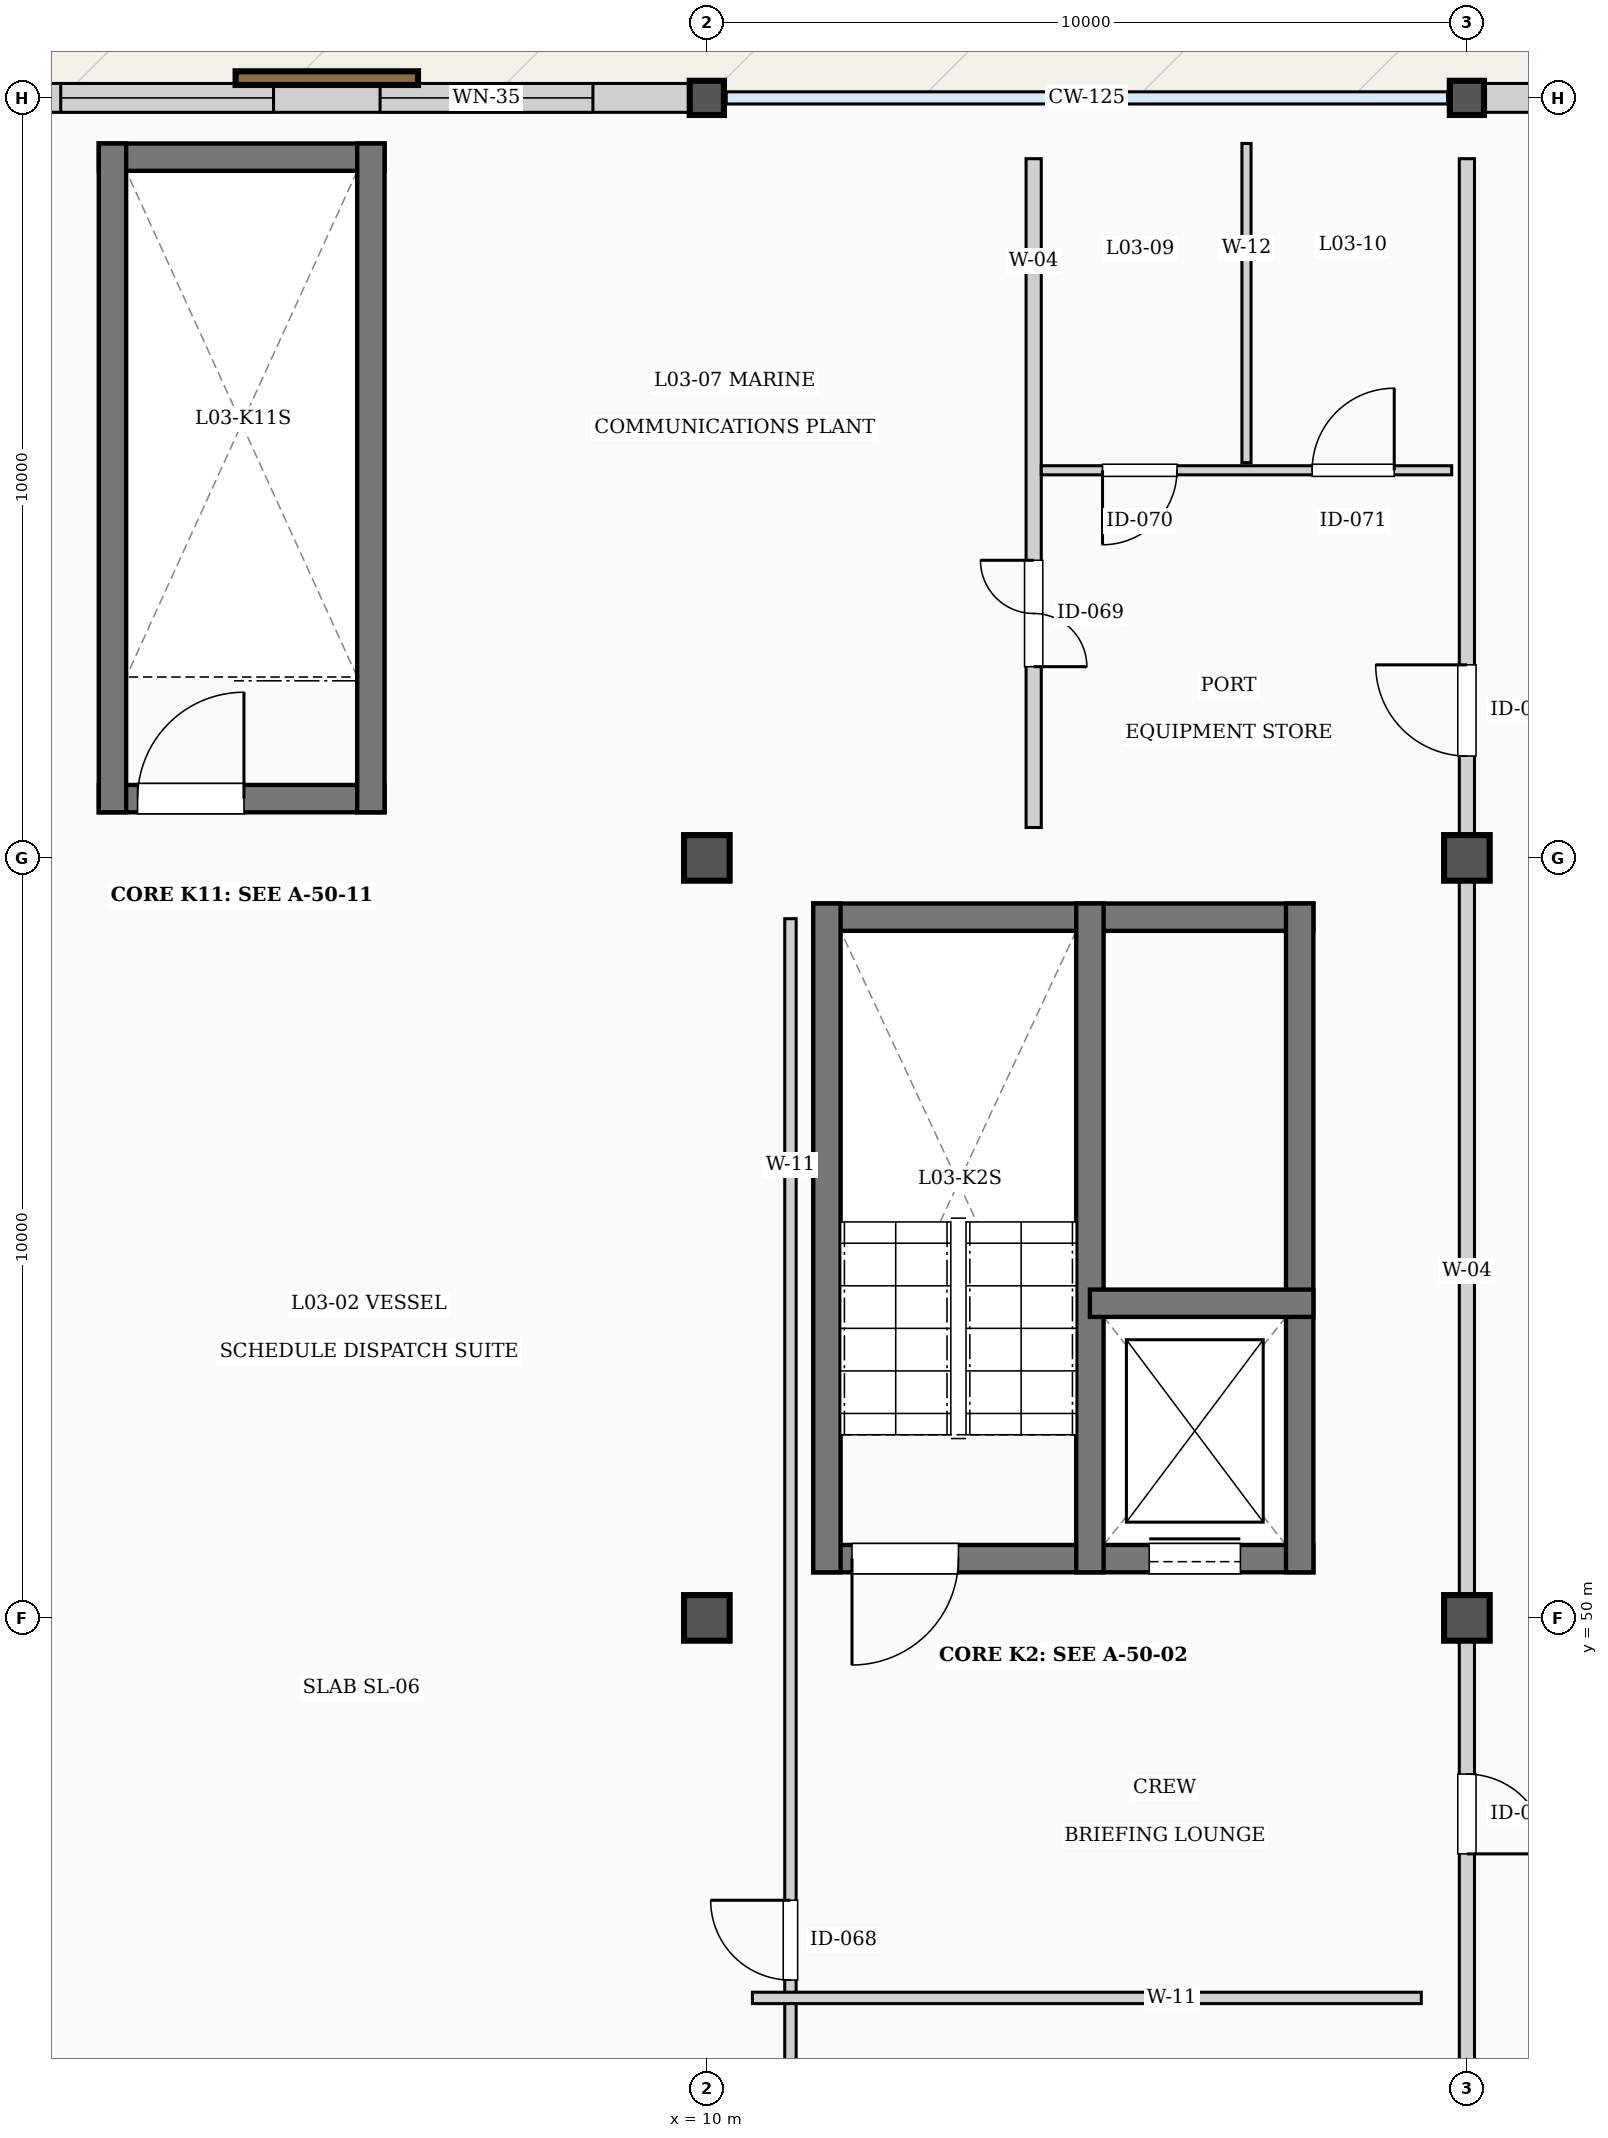
"""IFC4 building model, lengths in metres.
Left out: names, types, materials, properties, quantities, classifications, styles, units other than length and angle.
Written with IfcOpenShell. Run it as: python <this file> out.ifc"""

import sys

from ifc_helpers import new_model, si_unit, direction, frame, frame_2d, origin, origin_2d, place, context, subcontext, project, spatial, rectangle, extrude, element, fill, save


model = new_model("IFC4")
c1 = context("Model", 3, precision=1e-05, world=origin(), true_north=direction((0.0, 1.0)))
c2 = subcontext(c1, "Body", "Model", "MODEL_VIEW")
j1 = project(units=[si_unit("LENGTHUNIT", "METRE"), si_unit("PLANEANGLEUNIT", "RADIAN")], contexts=[c1])
p1 = place(None, origin())
s1 = spatial("IfcSite", under=j1, at=p1, CompositionType="ELEMENT")
p2 = place(p1, origin())
s2 = spatial("IfcBuilding", under=s1, at=p2, CompositionType="ELEMENT")
p3 = place(p2, frame((0.0, 0.0, 14.4)))
s3 = spatial("IfcBuildingStorey", under=s2, at=p3, CompositionType="ELEMENT", Elevation=14.4)
for number, where, z_axis, x_axis in (
    (1, (10.0, 50.0, 0.0), (0.0, 0.0, 1.0), (1.0, 0.0, 0.0)),
    (2, (10.0, 60.0, 0.0), (0.0, 0.0, 1.0), (1.0, 0.0, 0.0)),
):
    element("IfcColumn", number, at=place(p3, frame(where, z_axis=z_axis, x_axis=x_axis)), inside=s3, PredefinedType="COLUMN", context=c2, shape_type="SweptSolid", body=[
        extrude(rectangle(XDim=0.6, YDim=0.6, at=origin_2d()), origin(), (0.0, 0.0, 1.0), 3.9),
    ])
p4 = place(p3, frame((10.0, 70.0, 0.0), z_axis=(0.0, 0.0, 1.0), x_axis=(1.0, 0.0, 0.0)))
e3 = element("IfcColumn", 3, at=p4, inside=s3, PredefinedType="COLUMN", context=c2, shape_type="SweptSolid", body=[
    extrude(rectangle(XDim=0.45, YDim=0.45, at=origin_2d()), origin(), (0.0, 0.0, 1.0), 3.9),
])
for number, where, z_axis, x_axis in (
    (4, (20.0, 50.0, 0.0), (0.0, 0.0, 1.0), (1.0, 0.0, 0.0)),
    (5, (20.0, 60.0, 0.0), (0.0, 0.0, 1.0), (1.0, 0.0, 0.0)),
):
    element("IfcColumn", number, at=place(p3, frame(where, z_axis=z_axis, x_axis=x_axis)), inside=s3, PredefinedType="COLUMN", context=c2, shape_type="SweptSolid", body=[
        extrude(rectangle(XDim=0.6, YDim=0.6, at=origin_2d()), origin(), (0.0, 0.0, 1.0), 3.9),
    ])
p5 = place(p3, frame((20.0, 70.0, 0.0), z_axis=(0.0, 0.0, 1.0), x_axis=(1.0, 0.0, 0.0)))
e6 = element("IfcColumn", 6, at=p5, inside=s3, PredefinedType="COLUMN", context=c2, shape_type="SweptSolid", body=[
    extrude(rectangle(XDim=0.45, YDim=0.45, at=origin_2d()), origin(), (0.0, 0.0, 1.0), 3.9),
])
p6 = place(p3, frame((0.225, 70.0, 0.0), z_axis=(0.0, 0.0, 1.0), x_axis=(1.0, 0.0, 0.0)))
e7 = element("IfcWall", 7, at=p6, inside=s3, PredefinedType="SOLIDWALL", context=c2, shape_type="SweptSolid", body=[
    extrude(rectangle(XDim=9.55, YDim=0.38, at=frame_2d((4.775, 0.0))), origin(), (0.0, 0.0, 1.0), 3.2),
])
p7 = place(p6, frame((1.274, 0.0, 0.9)))
e8 = element("IfcOpeningElement", 8, at=p7, cuts=e7, PredefinedType="OPENING", context=c2, shape_type="SweptSolid", body=[
    extrude(rectangle(XDim=2.8, YDim=1.8, at=frame_2d((1.4, 0.9))), frame((0.0, 0.2, 0.0), z_axis=(0.0, -1.0, 0.0), x_axis=(1.0, 0.0, 0.0)), (0.0, 0.0, 1.0), 0.4),
])
p8 = place(p6, frame((5.476, 0.0, 0.9)))
e9 = element("IfcOpeningElement", 9, at=p8, cuts=e7, PredefinedType="OPENING", context=c2, shape_type="SweptSolid", body=[
    extrude(rectangle(XDim=2.8, YDim=1.8, at=frame_2d((1.4, 0.9))), frame((0.0, 0.2, 0.0), z_axis=(0.0, -1.0, 0.0), x_axis=(1.0, 0.0, 0.0)), (0.0, 0.0, 1.0), 0.4),
])
p9 = place(p3, frame((20.225, 70.0, 0.0), z_axis=(0.0, 0.0, 1.0), x_axis=(1.0, 0.0, 0.0)))
e10 = element("IfcWall", 10, at=p9, inside=s3, PredefinedType="SOLIDWALL", context=c2, shape_type="SweptSolid", body=[
    extrude(rectangle(XDim=9.55, YDim=0.38, at=frame_2d((4.775, 0.0))), origin(), (0.0, 0.0, 1.0), 3.2),
])
p10 = place(p9, frame((4.225, 0.0, 0.0)))
e11 = element("IfcOpeningElement", 11, at=p10, cuts=e10, PredefinedType="OPENING", context=c2, shape_type="SweptSolid", body=[
    extrude(rectangle(XDim=1.1, YDim=2.35, at=frame_2d((0.55, 1.175))), frame((0.0, 0.2, 0.0), z_axis=(0.0, -1.0, 0.0), x_axis=(1.0, 0.0, 0.0)), (0.0, 0.0, 1.0), 0.4),
])
p11 = place(p3, frame((11.4, 50.78, 0.0), z_axis=(0.0, 0.0, 1.0), x_axis=(1.0, 0.0, 0.0)))
e12 = element("IfcWall", 12, at=p11, inside=s3, PredefinedType="SHEAR", context=c2, shape_type="SweptSolid", body=[
    extrude(rectangle(XDim=6.58, YDim=0.36, at=frame_2d((3.29, 0.0))), origin(), (0.0, 0.0, 1.0), 3.9),
])
p12 = place(p11, frame((0.51, 0.0, 0.0)))
e13 = element("IfcOpeningElement", 13, at=p12, cuts=e12, PredefinedType="OPENING", context=c2, shape_type="SweptSolid", body=[
    extrude(rectangle(XDim=1.4, YDim=2.35, at=frame_2d((0.7, 1.175))), frame((0.0, 0.19, 0.0), z_axis=(0.0, -1.0, 0.0), x_axis=(1.0, 0.0, 0.0)), (0.0, 0.0, 1.0), 0.38),
])
p13 = place(p11, frame((4.42, 0.0, 0.0)))
e14 = element("IfcOpeningElement", 14, at=p13, cuts=e12, PredefinedType="OPENING", context=c2, shape_type="SweptSolid", body=[
    extrude(rectangle(XDim=1.2, YDim=2.35, at=frame_2d((0.6, 1.175))), frame((0.0, 0.19, 0.0), z_axis=(0.0, -1.0, 0.0), x_axis=(1.0, 0.0, 0.0)), (0.0, 0.0, 1.0), 0.38),
])
p14 = place(p3, frame((11.4, 59.22, 0.0), z_axis=(0.0, 0.0, 1.0), x_axis=(1.0, 0.0, 0.0)))
e15 = element("IfcWall", 15, at=p14, inside=s3, PredefinedType="SHEAR", context=c2, shape_type="SweptSolid", body=[
    extrude(rectangle(XDim=6.58, YDim=0.36, at=frame_2d((3.29, 0.0))), origin(), (0.0, 0.0, 1.0), 3.9),
])
for number, where, z_axis, x_axis in (
    (16, (11.58, 50.6, 0.0), (0.0, 0.0, 1.0), (0.0, 1.0, 0.0)),
    (17, (17.8, 50.6, 0.0), (0.0, 0.0, 1.0), (0.0, 1.0, 0.0)),
    (18, (15.04, 50.6, 0.0), (0.0, 0.0, 1.0), (0.0, 1.0, 0.0)),
):
    element("IfcWall", number, at=place(p3, frame(where, z_axis=z_axis, x_axis=x_axis)), inside=s3, PredefinedType="SHEAR", context=c2, shape_type="SweptSolid", body=[
        extrude(rectangle(XDim=8.8, YDim=0.36, at=frame_2d((4.4, 0.0))), origin(), (0.0, 0.0, 1.0), 3.9),
    ])
p15 = place(p3, frame((15.04, 54.14, 0.0), z_axis=(0.0, 0.0, 1.0), x_axis=(1.0, 0.0, 0.0)))
e19 = element("IfcWall", 19, at=p15, inside=s3, PredefinedType="SHEAR", context=c2, shape_type="SweptSolid", body=[
    extrude(rectangle(XDim=2.94, YDim=0.36, at=frame_2d((1.47, 0.0))), origin(), (0.0, 0.0, 1.0), 3.9),
])
p16 = place(p3, frame((2.0, 60.78, 0.0), z_axis=(0.0, 0.0, 1.0), x_axis=(1.0, 0.0, 0.0)))
e20 = element("IfcWall", 20, at=p16, inside=s3, PredefinedType="SHEAR", context=c2, shape_type="SweptSolid", body=[
    extrude(rectangle(XDim=3.76, YDim=0.36, at=frame_2d((1.88, 0.0))), origin(), (0.0, 0.0, 1.0), 3.9),
])
p17 = place(p16, frame((0.51, 0.0, 0.0)))
e21 = element("IfcOpeningElement", 21, at=p17, cuts=e20, PredefinedType="OPENING", context=c2, shape_type="SweptSolid", body=[
    extrude(rectangle(XDim=1.4, YDim=2.35, at=frame_2d((0.7, 1.175))), frame((0.0, 0.19, 0.0), z_axis=(0.0, -1.0, 0.0), x_axis=(1.0, 0.0, 0.0)), (0.0, 0.0, 1.0), 0.38),
])
p18 = place(p3, frame((2.0, 69.22, 0.0), z_axis=(0.0, 0.0, 1.0), x_axis=(1.0, 0.0, 0.0)))
e22 = element("IfcWall", 22, at=p18, inside=s3, PredefinedType="SHEAR", context=c2, shape_type="SweptSolid", body=[
    extrude(rectangle(XDim=3.76, YDim=0.36, at=frame_2d((1.88, 0.0))), origin(), (0.0, 0.0, 1.0), 3.9),
])
for number, where, z_axis, x_axis in (
    (23, (2.18, 60.6, 0.0), (0.0, 0.0, 1.0), (0.0, 1.0, 0.0)),
    (24, (5.58, 60.6, 0.0), (0.0, 0.0, 1.0), (0.0, 1.0, 0.0)),
):
    element("IfcWall", number, at=place(p3, frame(where, z_axis=z_axis, x_axis=x_axis)), inside=s3, PredefinedType="SHEAR", context=c2, shape_type="SweptSolid", body=[
        extrude(rectangle(XDim=8.8, YDim=0.36, at=frame_2d((4.4, 0.0))), origin(), (0.0, 0.0, 1.0), 3.9),
    ])
p19 = place(p3, frame((20.0, 20.8, 0.0), z_axis=(0.0, 0.0, 1.0), x_axis=(0.0, 1.0, 0.0)))
e25 = element("IfcWall", 25, at=p19, inside=s3, PredefinedType="PARTITIONING", context=c2, shape_type="SweptSolid", body=[
    extrude(rectangle(XDim=48.4, YDim=0.2, at=frame_2d((24.2, 0.0))), origin(), (0.0, 0.0, 1.0), 3.33),
])
p20 = place(p19, frame((10.332, 0.0, 0.0)))
e26 = element("IfcOpeningElement", 26, at=p20, cuts=e25, PredefinedType="OPENING", context=c2, shape_type="SweptSolid", body=[
    extrude(rectangle(XDim=1.6, YDim=2.4, at=frame_2d((0.8, 1.2))), frame((0.0, 0.11, 0.0), z_axis=(0.0, -1.0, 0.0), x_axis=(1.0, 0.0, 0.0)), (0.0, 0.0, 1.0), 0.22),
])
p21 = place(p19, frame((19.853, 0.0, 0.0)))
e27 = element("IfcOpeningElement", 27, at=p21, cuts=e25, PredefinedType="OPENING", context=c2, shape_type="SweptSolid", body=[
    extrude(rectangle(XDim=0.95, YDim=2.4, at=frame_2d((0.475, 1.2))), frame((0.0, 0.11, 0.0), z_axis=(0.0, -1.0, 0.0), x_axis=(1.0, 0.0, 0.0)), (0.0, 0.0, 1.0), 0.22),
])
p22 = place(p19, frame((26.095, 0.0, 0.0)))
e28 = element("IfcOpeningElement", 28, at=p22, cuts=e25, PredefinedType="OPENING", context=c2, shape_type="SweptSolid", body=[
    extrude(rectangle(XDim=1.05, YDim=2.3, at=frame_2d((0.525, 1.15))), frame((0.0, 0.11, 0.0), z_axis=(0.0, -1.0, 0.0), x_axis=(1.0, 0.0, 0.0)), (0.0, 0.0, 1.0), 0.22),
])
p23 = place(p19, frame((40.54, 0.0, 0.0)))
e29 = element("IfcOpeningElement", 29, at=p23, cuts=e25, PredefinedType="OPENING", context=c2, shape_type="SweptSolid", body=[
    extrude(rectangle(XDim=1.2, YDim=2.35, at=frame_2d((0.6, 1.175))), frame((0.0, 0.11, 0.0), z_axis=(0.0, -1.0, 0.0), x_axis=(1.0, 0.0, 0.0)), (0.0, 0.0, 1.0), 0.22),
])
p24 = place(p3, frame((11.1, 20.8, 0.0), z_axis=(0.0, 0.0, 1.0), x_axis=(0.0, 1.0, 0.0)))
e30 = element("IfcWall", 30, at=p24, inside=s3, PredefinedType="PARTITIONING", context=c2, shape_type="SweptSolid", body=[
    extrude(rectangle(XDim=38.4, YDim=0.15, at=frame_2d((19.2, 0.0))), origin(), (0.0, 0.0, 1.0), 3.56),
])
p25 = place(p24, frame((16.396, 0.0, 0.0)))
e31 = element("IfcOpeningElement", 31, at=p25, cuts=e30, PredefinedType="OPENING", context=c2, shape_type="SweptSolid", body=[
    extrude(rectangle(XDim=1.0, YDim=2.3, at=frame_2d((0.5, 1.15))), frame((0.0, 0.085, 0.0), z_axis=(0.0, -1.0, 0.0), x_axis=(1.0, 0.0, 0.0)), (0.0, 0.0, 1.0), 0.17),
])
p26 = place(p24, frame((24.435, 0.0, 0.0)))
e32 = element("IfcOpeningElement", 32, at=p26, cuts=e30, PredefinedType="OPENING", context=c2, shape_type="SweptSolid", body=[
    extrude(rectangle(XDim=1.05, YDim=2.45, at=frame_2d((0.525, 1.225))), frame((0.0, 0.085, 0.0), z_axis=(0.0, -1.0, 0.0), x_axis=(1.0, 0.0, 0.0)), (0.0, 0.0, 1.0), 0.17),
])
p27 = place(p3, frame((10.6, 45.0, 0.0), z_axis=(0.0, 0.0, 1.0), x_axis=(1.0, 0.0, 0.0)))
e33 = element("IfcWall", 33, at=p27, inside=s3, PredefinedType="PARTITIONING", context=c2, shape_type="SweptSolid", body=[
    extrude(rectangle(XDim=8.8, YDim=0.15, at=frame_2d((4.4, 0.0))), origin(), (0.0, 0.0, 1.0), 3.56),
])
p28 = place(p3, frame((14.3, 60.4, 0.0), z_axis=(0.0, 0.0, 1.0), x_axis=(0.0, 1.0, 0.0)))
e34 = element("IfcWall", 34, at=p28, inside=s3, PredefinedType="PARTITIONING", context=c2, shape_type="SweptSolid", body=[
    extrude(rectangle(XDim=8.8, YDim=0.2, at=frame_2d((4.4, 0.0))), origin(), (0.0, 0.0, 1.0), 3.56),
])
p29 = place(p28, frame((2.116, 0.0, 0.0)))
e35 = element("IfcOpeningElement", 35, at=p29, cuts=e34, PredefinedType="OPENING", context=c2, shape_type="SweptSolid", body=[
    extrude(rectangle(XDim=1.4, YDim=2.5, at=frame_2d((0.7, 1.25))), frame((0.0, 0.11, 0.0), z_axis=(0.0, -1.0, 0.0), x_axis=(1.0, 0.0, 0.0)), (0.0, 0.0, 1.0), 0.22),
])
p30 = place(p3, frame((14.4, 65.1, 0.0), z_axis=(0.0, 0.0, 1.0), x_axis=(1.0, 0.0, 0.0)))
e36 = element("IfcWall", 36, at=p30, inside=s3, PredefinedType="PARTITIONING", context=c2, shape_type="SweptSolid", body=[
    extrude(rectangle(XDim=5.4, YDim=0.12, at=frame_2d((2.7, 0.0))), origin(), (0.0, 0.0, 1.0), 3.56),
])
p31 = place(p30, frame((0.806, 0.0, 0.0)))
e37 = element("IfcOpeningElement", 37, at=p31, cuts=e36, PredefinedType="OPENING", context=c2, shape_type="SweptSolid", body=[
    extrude(rectangle(XDim=0.98, YDim=2.3, at=frame_2d((0.49, 1.15))), frame((0.0, 0.07, 0.0), z_axis=(0.0, -1.0, 0.0), x_axis=(1.0, 0.0, 0.0)), (0.0, 0.0, 1.0), 0.14),
])
p32 = place(p30, frame((3.564, 0.0, 0.0)))
e38 = element("IfcOpeningElement", 38, at=p32, cuts=e36, PredefinedType="OPENING", context=c2, shape_type="SweptSolid", body=[
    extrude(rectangle(XDim=1.08, YDim=2.35, at=frame_2d((0.54, 1.175))), frame((0.0, 0.07, 0.0), z_axis=(0.0, -1.0, 0.0), x_axis=(1.0, 0.0, 0.0)), (0.0, 0.0, 1.0), 0.14),
])
p33 = place(p3, frame((17.1, 65.2, 0.0), z_axis=(0.0, 0.0, 1.0), x_axis=(0.0, 1.0, 0.0)))
e39 = element("IfcWall", 39, at=p33, inside=s3, PredefinedType="PARTITIONING", context=c2, shape_type="SweptSolid", body=[
    extrude(rectangle(XDim=4.2, YDim=0.12, at=frame_2d((2.1, 0.0))), origin(), (0.0, 0.0, 1.0), 3.56),
])
p34 = place(p7, origin())
e40 = element("IfcWindow", 40, at=p34, inside=s3, PartitioningType="SINGLE_PANEL", PredefinedType="WINDOW", context=c2, shape_type="SweptSolid", body=[
    extrude(rectangle(XDim=2.8, YDim=1.8, at=frame_2d((1.4, 0.9))), frame((0.0, 0.03, 0.0), z_axis=(0.0, -1.0, 0.0), x_axis=(1.0, 0.0, 0.0)), (0.0, 0.0, 1.0), 0.06),
])
fill(e8, e40)
p35 = place(p8, origin())
e41 = element("IfcWindow", 41, at=p35, inside=s3, PartitioningType="SINGLE_PANEL", PredefinedType="WINDOW", context=c2, shape_type="SweptSolid", body=[
    extrude(rectangle(XDim=2.8, YDim=1.8, at=frame_2d((1.4, 0.9))), frame((0.0, 0.03, 0.0), z_axis=(0.0, -1.0, 0.0), x_axis=(1.0, 0.0, 0.0)), (0.0, 0.0, 1.0), 0.06),
])
fill(e9, e41)
p36 = place(p12, origin())
e42 = element("IfcDoor", 42, at=p36, inside=s3, OperationType="SINGLE_SWING_LEFT", PredefinedType="DOOR", context=c2, shape_type="SweptSolid", body=[
    extrude(rectangle(XDim=1.4, YDim=2.35, at=frame_2d((0.7, 1.175))), frame((0.0, 0.025, 0.0), z_axis=(0.0, -1.0, 0.0), x_axis=(1.0, 0.0, 0.0)), (0.0, 0.0, 1.0), 0.05),
])
fill(e13, e42)
p37 = place(p13, origin())
e43 = element("IfcDoor", 43, at=p37, inside=s3, OperationType="SLIDING_TO_LEFT", PredefinedType="DOOR", context=c2, shape_type="SweptSolid", body=[
    extrude(rectangle(XDim=1.2, YDim=2.35, at=frame_2d((0.6, 1.175))), frame((0.0, 0.025, 0.0), z_axis=(0.0, -1.0, 0.0), x_axis=(1.0, 0.0, 0.0)), (0.0, 0.0, 1.0), 0.05),
])
fill(e14, e43)
p38 = place(p17, origin())
e44 = element("IfcDoor", 44, at=p38, inside=s3, OperationType="SINGLE_SWING_RIGHT", PredefinedType="DOOR", context=c2, shape_type="SweptSolid", body=[
    extrude(rectangle(XDim=1.4, YDim=2.35, at=frame_2d((0.7, 1.175))), frame((0.0, 0.025, 0.0), z_axis=(0.0, -1.0, 0.0), x_axis=(1.0, 0.0, 0.0)), (0.0, 0.0, 1.0), 0.05),
])
fill(e21, e44)
p39 = place(p22, origin())
e45 = element("IfcDoor", 45, at=p39, inside=s3, OperationType="SINGLE_SWING_LEFT", PredefinedType="DOOR", context=c2, shape_type="SweptSolid", body=[
    extrude(rectangle(XDim=1.05, YDim=2.3, at=frame_2d((0.525, 1.15))), frame((0.0, 0.025, 0.0), z_axis=(0.0, -1.0, 0.0), x_axis=(1.0, 0.0, 0.0)), (0.0, 0.0, 1.0), 0.05),
])
fill(e28, e45)
p40 = place(p23, origin())
e46 = element("IfcDoor", 46, at=p40, inside=s3, OperationType="SINGLE_SWING_RIGHT", PredefinedType="DOOR", context=c2, shape_type="SweptSolid", body=[
    extrude(rectangle(XDim=1.2, YDim=2.35, at=frame_2d((0.6, 1.175))), frame((0.0, 0.025, 0.0), z_axis=(0.0, -1.0, 0.0), x_axis=(1.0, 0.0, 0.0)), (0.0, 0.0, 1.0), 0.05),
])
fill(e29, e46)
p41 = place(p26, origin())
e47 = element("IfcDoor", 47, at=p41, inside=s3, OperationType="SINGLE_SWING_RIGHT", PredefinedType="DOOR", context=c2, shape_type="SweptSolid", body=[
    extrude(rectangle(XDim=1.05, YDim=2.45, at=frame_2d((0.525, 1.225))), frame((0.0, 0.025, 0.0), z_axis=(0.0, -1.0, 0.0), x_axis=(1.0, 0.0, 0.0)), (0.0, 0.0, 1.0), 0.05),
])
fill(e32, e47)
p42 = place(p29, origin())
e48 = element("IfcDoor", 48, at=p42, inside=s3, OperationType="DOUBLE_DOOR_SINGLE_SWING", PredefinedType="DOOR", context=c2, shape_type="SweptSolid", body=[
    extrude(rectangle(XDim=1.4, YDim=2.5, at=frame_2d((0.7, 1.25))), frame((0.0, 0.025, 0.0), z_axis=(0.0, -1.0, 0.0), x_axis=(1.0, 0.0, 0.0)), (0.0, 0.0, 1.0), 0.05),
])
fill(e35, e48)
p43 = place(p31, origin())
e49 = element("IfcDoor", 49, at=p43, inside=s3, OperationType="SINGLE_SWING_LEFT", PredefinedType="DOOR", context=c2, shape_type="SweptSolid", body=[
    extrude(rectangle(XDim=0.98, YDim=2.3, at=frame_2d((0.49, 1.15))), frame((0.0, 0.025, 0.0), z_axis=(0.0, -1.0, 0.0), x_axis=(1.0, 0.0, 0.0)), (0.0, 0.0, 1.0), 0.05),
])
fill(e37, e49)
p44 = place(p32, origin())
e50 = element("IfcDoor", 50, at=p44, inside=s3, OperationType="SINGLE_SWING_RIGHT", PredefinedType="DOOR", context=c2, shape_type="SweptSolid", body=[
    extrude(rectangle(XDim=1.08, YDim=2.35, at=frame_2d((0.54, 1.175))), frame((0.0, 0.025, 0.0), z_axis=(0.0, -1.0, 0.0), x_axis=(1.0, 0.0, 0.0)), (0.0, 0.0, 1.0), 0.05),
])
fill(e38, e50)
save(model, sys.argv[1])
